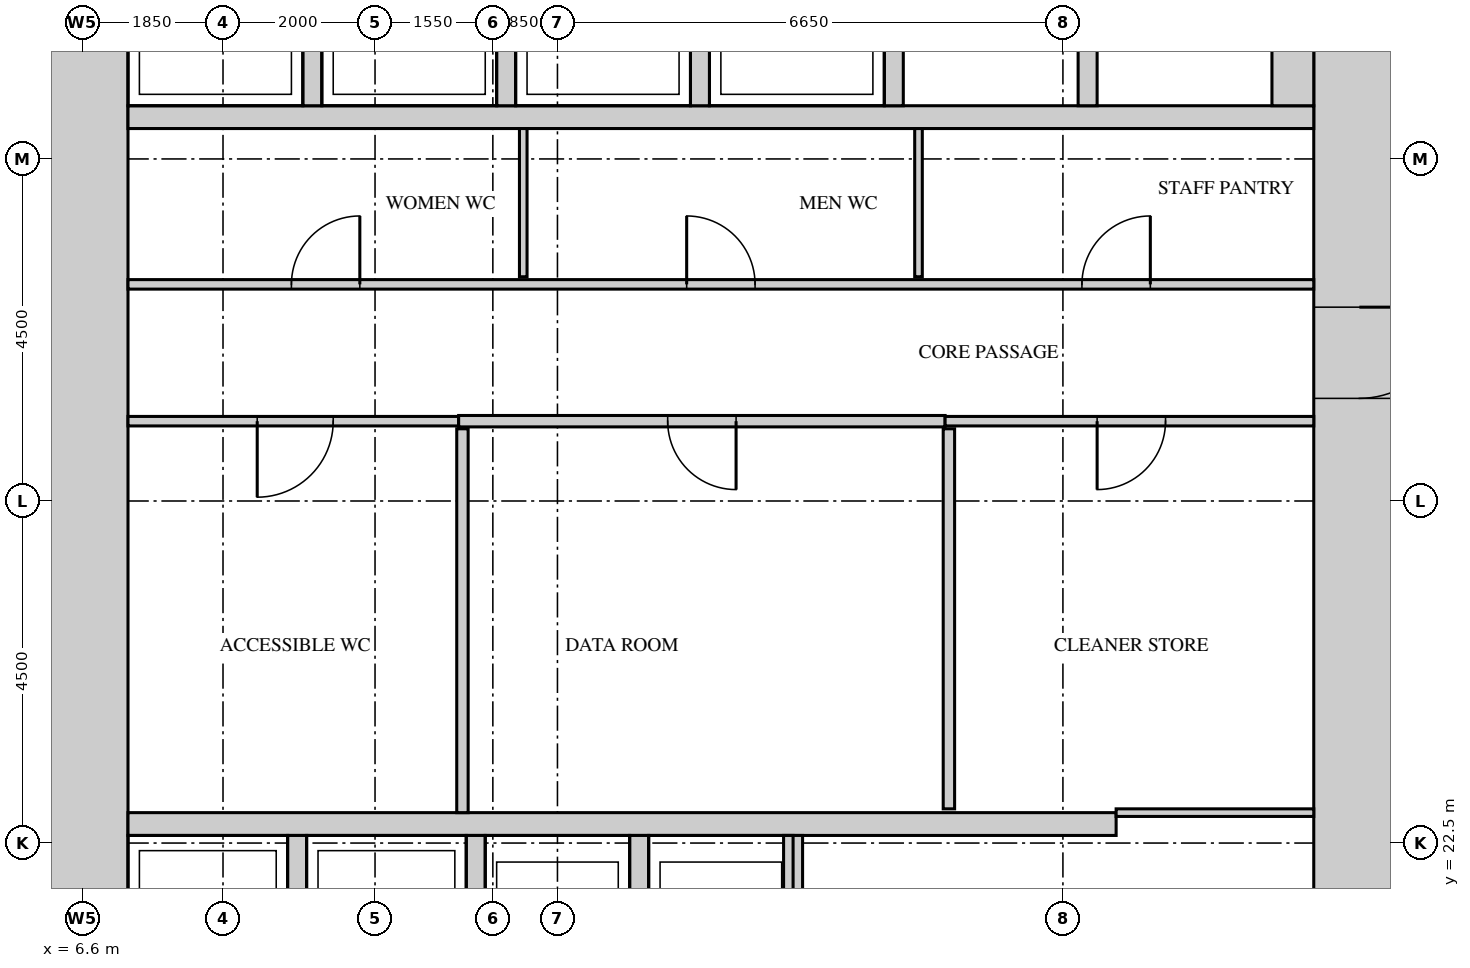
"""IFC4 building model, lengths in metres.
Left out: names, types, materials, properties, quantities, classifications, styles, units other than length and angle.
Written with IfcOpenShell. Run it as: python <this file> out.ifc"""

import sys

from ifc_helpers import new_model, si_unit, direction, frame, frame_2d, origin, place, context, subcontext, project, spatial, rectangle, extrude, source, transform, mapped, element, fill, save


model = new_model("IFC4")
c1 = context("Model", 3, precision=1e-05, world=origin(), true_north=direction((0.0, 1.0)))
c2 = subcontext(c1, "Body", "Model", "MODEL_VIEW")
j1 = project(units=[si_unit("LENGTHUNIT", "METRE"), si_unit("PLANEANGLEUNIT", "RADIAN")], contexts=[c1])
p1 = place(None, origin())
s1 = spatial("IfcSite", under=j1, at=p1, CompositionType="ELEMENT")
p2 = place(p1, origin())
s2 = spatial("IfcBuilding", under=s1, at=p2, CompositionType="ELEMENT")
p3 = place(p2, frame((0.0, 0.0, 46.5)))
s3 = spatial("IfcBuildingStorey", under=s2, at=p3, CompositionType="ELEMENT", Elevation=46.5)
m1 = source(origin(), c2, "Body", "SweptSolid", [
    extrude(rectangle(XDim=27.6, YDim=1.2, at=frame_2d((13.8, 0.0))), origin(), (0.0, 0.0, 1.0), 4.2),
])
p4 = place(p3, frame((23.4, 13.2, 0.0), z_axis=(0.0, 0.0, 1.0), x_axis=(0.0, 1.0, 0.0)))
e1 = element("IfcWall", 1, at=p4, inside=s3, PredefinedType="SHEAR", context=c2, shape_type="MappedRepresentation", body=[
    mapped(m1, transform((0.0, 0.0, 0.0))),
])
m2 = source(origin(), c2, "Body", "SweptSolid", [
    extrude(rectangle(XDim=1.8, YDim=2.1, at=frame_2d((0.9, 1.05))), frame((0.0, 0.61, 0.0), z_axis=(0.0, -1.0, 0.0), x_axis=(1.0, 0.0, 0.0)), (0.0, 0.0, 1.0), 1.22),
])
p5 = place(p4, frame((22.4, 0.0, 0.0)))
e2 = element("IfcOpeningElement", 2, at=p5, cuts=e1, PredefinedType="OPENING", context=c2, shape_type="MappedRepresentation", body=[
    mapped(m2, transform((0.0, 0.0, 0.0))),
])
m3 = source(origin(), c2, "Body", "SweptSolid", [
    extrude(rectangle(XDim=1.2, YDim=2.1, at=frame_2d((0.6, 1.05))), frame((0.0, 0.61, 0.0), z_axis=(0.0, -1.0, 0.0), x_axis=(1.0, 0.0, 0.0)), (0.0, 0.0, 1.0), 1.22),
])
p6 = place(p4, frame((15.15, 0.0, 0.0)))
e3 = element("IfcOpeningElement", 3, at=p6, cuts=e1, PredefinedType="OPENING", context=c2, shape_type="MappedRepresentation", body=[
    mapped(m3, transform((0.0, 0.0, 0.0))),
])
m4 = source(origin(), c2, "Body", "SweptSolid", [
    extrude(rectangle(XDim=0.9, YDim=2.1, at=frame_2d((0.45, 1.05))), frame((0.0, 0.61, 0.0), z_axis=(0.0, -1.0, 0.0), x_axis=(1.0, 0.0, 0.0)), (0.0, 0.0, 1.0), 1.22),
])
p7 = place(p4, frame((1.15, 0.0, 0.0)))
e4 = element("IfcOpeningElement", 4, at=p7, cuts=e1, PredefinedType="OPENING", context=c2, shape_type="MappedRepresentation", body=[
    mapped(m4, transform((0.0, 0.0, 0.0))),
])
p8 = place(p4, frame((4.35, 0.0, 0.0)))
e5 = element("IfcOpeningElement", 5, at=p8, cuts=e1, PredefinedType="OPENING", context=c2, shape_type="MappedRepresentation", body=[
    mapped(m4, transform((0.0, 0.0, 0.0))),
])
p9 = place(p4, frame((7.6, 0.0, 0.0)))
e6 = element("IfcOpeningElement", 6, at=p9, cuts=e1, PredefinedType="OPENING", context=c2, shape_type="MappedRepresentation", body=[
    mapped(m4, transform((0.0, 0.0, 0.0))),
])
p10 = place(p3, frame((6.6, 13.2, 0.0), z_axis=(0.0, 0.0, 1.0), x_axis=(0.0, 1.0, 0.0)))
e7 = element("IfcWall", 7, at=p10, inside=s3, PredefinedType="SHEAR", context=c2, shape_type="MappedRepresentation", body=[
    mapped(m1, transform((0.0, 0.0, 0.0))),
])
m5 = source(origin(), c2, "Body", "SweptSolid", [
    extrude(rectangle(XDim=13.0, YDim=0.3, at=frame_2d((6.5, 0.0))), origin(), (0.0, 0.0, 1.0), 4.2),
])
p11 = place(p3, frame((7.2, 22.75, 0.0), z_axis=(0.0, 0.0, 1.0), x_axis=(1.0, 0.0, 0.0)))
e8 = element("IfcWall", 8, at=p11, inside=s3, PredefinedType="STANDARD", context=c2, shape_type="MappedRepresentation", body=[
    mapped(m5, transform((0.0, 0.0, 0.0))),
])
m6 = source(origin(), c2, "Body", "SweptSolid", [
    extrude(rectangle(XDim=15.6, YDim=0.3, at=frame_2d((7.8, 0.0))), origin(), (0.0, 0.0, 1.0), 4.2),
])
p12 = place(p3, frame((7.2, 32.05, 0.0), z_axis=(0.0, 0.0, 1.0), x_axis=(1.0, 0.0, 0.0)))
e9 = element("IfcWall", 9, at=p12, inside=s3, PredefinedType="STANDARD", context=c2, shape_type="MappedRepresentation", body=[
    mapped(m6, transform((0.0, 0.0, 0.0))),
])
m7 = source(origin(), c2, "Body", "SweptSolid", [
    extrude(rectangle(XDim=3.1, YDim=0.25, at=frame_2d((1.55, 0.0))), origin(), (0.0, 0.0, 1.0), 4.2),
])
for number, where, z_axis, x_axis in (
    (10, (9.425, 19.5, 0.0), (0.0, 0.0, 1.0), (0.0, 1.0, 0.0)),
    (11, (11.775, 19.5, 0.0), (0.0, 0.0, 1.0), (0.0, 1.0, 0.0)),
    (12, (13.925, 19.5, 0.0), (0.0, 0.0, 1.0), (0.0, 1.0, 0.0)),
    (13, (15.95, 19.5, 0.0), (0.0, 0.0, 1.0), (0.0, 1.0, 0.0)),
):
    element("IfcWall", number, at=place(p3, frame(where, z_axis=z_axis, x_axis=x_axis)), inside=s3, PredefinedType="STANDARD", context=c2, shape_type="MappedRepresentation", body=[
        mapped(m7, transform((0.0, 0.0, 0.0))),
    ])
m8 = source(origin(), c2, "Body", "SweptSolid", [
    extrude(rectangle(XDim=2.4, YDim=0.25, at=frame_2d((1.2, 0.0))), origin(), (0.0, 0.0, 1.0), 4.2),
])
for number, where, z_axis, x_axis in (
    (14, (9.625, 32.2, 0.0), (0.0, 0.0, 1.0), (0.0, 1.0, 0.0)),
    (15, (12.175, 32.2, 0.0), (0.0, 0.0, 1.0), (0.0, 1.0, 0.0)),
    (16, (14.725, 32.2, 0.0), (0.0, 0.0, 1.0), (0.0, 1.0, 0.0)),
    (17, (17.275, 32.2, 0.0), (0.0, 0.0, 1.0), (0.0, 1.0, 0.0)),
    (18, (19.825, 32.2, 0.0), (0.0, 0.0, 1.0), (0.0, 1.0, 0.0)),
):
    element("IfcWall", number, at=place(p3, frame(where, z_axis=z_axis, x_axis=x_axis)), inside=s3, PredefinedType="STANDARD", context=c2, shape_type="MappedRepresentation", body=[
        mapped(m8, transform((0.0, 0.0, 0.0))),
    ])
m9 = source(origin(), c2, "Body", "SweptSolid", [
    extrude(rectangle(XDim=2.4, YDim=0.55, at=frame_2d((1.2, 0.0))), origin(), (0.0, 0.0, 1.0), 4.2),
])
p13 = place(p3, frame((22.525, 32.2, 0.0), z_axis=(0.0, 0.0, 1.0), x_axis=(0.0, 1.0, 0.0)))
e19 = element("IfcWall", 19, at=p13, inside=s3, PredefinedType="STANDARD", context=c2, shape_type="MappedRepresentation", body=[
    mapped(m9, transform((0.0, 0.0, 0.0))),
])
m10 = source(origin(), c2, "Body", "SweptSolid", [
    extrude(rectangle(XDim=5.05, YDim=0.15, at=frame_2d((2.525, 0.0))), origin(), (0.0, 0.0, 1.0), 4.3),
])
p14 = place(p3, frame((11.6, 22.9, 0.0), z_axis=(0.0, 0.0, 1.0), x_axis=(0.0, 1.0, 0.0)))
e20 = element("IfcWall", 20, at=p14, inside=s3, PredefinedType="PARTITIONING", context=c2, shape_type="MappedRepresentation", body=[
    mapped(m10, transform((0.0, 0.0, 0.0))),
])
m11 = source(origin(), c2, "Body", "SweptSolid", [
    extrude(rectangle(XDim=2.6, YDim=0.1, at=frame_2d((1.3, 0.0))), origin(), (0.0, 0.0, 1.0), 4.3),
])
p15 = place(p3, frame((20.2, 22.9, 0.0), z_axis=(0.0, 0.0, 1.0), x_axis=(1.0, 0.0, 0.0)))
e21 = element("IfcWall", 21, at=p15, inside=s3, PredefinedType="PARTITIONING", context=c2, shape_type="MappedRepresentation", body=[
    mapped(m11, transform((0.0, 0.0, 0.0))),
])
m12 = source(origin(), c2, "Body", "SweptSolid", [
    extrude(rectangle(XDim=5.0, YDim=0.15, at=frame_2d((2.5, 0.0))), origin(), (0.0, 0.0, 1.0), 4.3),
])
p16 = place(p3, frame((18.0, 22.95, 0.0), z_axis=(0.0, 0.0, 1.0), x_axis=(0.0, 1.0, 0.0)))
e22 = element("IfcWall", 22, at=p16, inside=s3, PredefinedType="PARTITIONING", context=c2, shape_type="MappedRepresentation", body=[
    mapped(m12, transform((0.0, 0.0, 0.0))),
])
m13 = source(origin(), c2, "Body", "SweptSolid", [
    extrude(rectangle(XDim=4.35, YDim=0.125, at=frame_2d((2.175, 0.0))), origin(), (0.0, 0.0, 1.0), 4.3),
])
p17 = place(p3, frame((7.2, 28.05, 0.0), z_axis=(0.0, 0.0, 1.0), x_axis=(1.0, 0.0, 0.0)))
e23 = element("IfcWall", 23, at=p17, inside=s3, PredefinedType="PARTITIONING", context=c2, shape_type="MappedRepresentation", body=[
    mapped(m13, transform((0.0, 0.0, 0.0))),
])
m14 = source(origin(), c2, "Body", "SweptSolid", [
    extrude(rectangle(XDim=1.0, YDim=2.1, at=frame_2d((0.5, 1.05))), frame((0.0, 0.073, 0.0), z_axis=(0.0, -1.0, 0.0), x_axis=(1.0, 0.0, 0.0)), (0.0, 0.0, 1.0), 0.145),
])
p18 = place(p17, frame((1.7, 0.0, 0.0)))
e24 = element("IfcOpeningElement", 24, at=p18, cuts=e23, PredefinedType="OPENING", context=c2, shape_type="MappedRepresentation", body=[
    mapped(m14, transform((0.0, 0.0, 0.0))),
])
m15 = source(origin(), c2, "Body", "SweptSolid", [
    extrude(rectangle(XDim=6.4, YDim=0.15, at=frame_2d((3.2, 0.0))), origin(), (0.0, 0.0, 1.0), 4.3),
])
p19 = place(p3, frame((11.55, 28.05, 0.0), z_axis=(0.0, 0.0, 1.0), x_axis=(1.0, 0.0, 0.0)))
e25 = element("IfcWall", 25, at=p19, inside=s3, PredefinedType="PARTITIONING", context=c2, shape_type="MappedRepresentation", body=[
    mapped(m15, transform((0.0, 0.0, 0.0))),
])
m16 = source(origin(), c2, "Body", "SweptSolid", [
    extrude(rectangle(XDim=0.9, YDim=2.1, at=frame_2d((0.45, 1.05))), frame((0.0, 0.085, 0.0), z_axis=(0.0, -1.0, 0.0), x_axis=(1.0, 0.0, 0.0)), (0.0, 0.0, 1.0), 0.17),
])
p20 = place(p19, frame((2.75, 0.0, 0.0)))
e26 = element("IfcOpeningElement", 26, at=p20, cuts=e25, PredefinedType="OPENING", context=c2, shape_type="MappedRepresentation", body=[
    mapped(m16, transform((0.0, 0.0, 0.0))),
])
m17 = source(origin(), c2, "Body", "SweptSolid", [
    extrude(rectangle(XDim=4.85, YDim=0.125, at=frame_2d((2.425, 0.0))), origin(), (0.0, 0.0, 1.0), 4.3),
])
p21 = place(p3, frame((17.95, 28.05, 0.0), z_axis=(0.0, 0.0, 1.0), x_axis=(1.0, 0.0, 0.0)))
e27 = element("IfcWall", 27, at=p21, inside=s3, PredefinedType="PARTITIONING", context=c2, shape_type="MappedRepresentation", body=[
    mapped(m17, transform((0.0, 0.0, 0.0))),
])
m18 = source(origin(), c2, "Body", "SweptSolid", [
    extrude(rectangle(XDim=0.9, YDim=2.1, at=frame_2d((0.45, 1.05))), frame((0.0, 0.073, 0.0), z_axis=(0.0, -1.0, 0.0), x_axis=(1.0, 0.0, 0.0)), (0.0, 0.0, 1.0), 0.145),
])
p22 = place(p21, frame((2.0, 0.0, 0.0)))
e28 = element("IfcOpeningElement", 28, at=p22, cuts=e27, PredefinedType="OPENING", context=c2, shape_type="MappedRepresentation", body=[
    mapped(m18, transform((0.0, 0.0, 0.0))),
])
m19 = source(origin(), c2, "Body", "SweptSolid", [
    extrude(rectangle(XDim=15.6, YDim=0.125, at=frame_2d((7.8, 0.0))), origin(), (0.0, 0.0, 1.0), 4.3),
])
p23 = place(p3, frame((7.2, 29.85, 0.0), z_axis=(0.0, 0.0, 1.0), x_axis=(1.0, 0.0, 0.0)))
e29 = element("IfcWall", 29, at=p23, inside=s3, PredefinedType="PARTITIONING", context=c2, shape_type="MappedRepresentation", body=[
    mapped(m19, transform((0.0, 0.0, 0.0))),
])
p24 = place(p23, frame((2.15, 0.0, 0.0)))
e30 = element("IfcOpeningElement", 30, at=p24, cuts=e29, PredefinedType="OPENING", context=c2, shape_type="MappedRepresentation", body=[
    mapped(m18, transform((0.0, 0.0, 0.0))),
])
p25 = place(p23, frame((7.35, 0.0, 0.0)))
e31 = element("IfcOpeningElement", 31, at=p25, cuts=e29, PredefinedType="OPENING", context=c2, shape_type="MappedRepresentation", body=[
    mapped(m18, transform((0.0, 0.0, 0.0))),
])
p26 = place(p23, frame((12.55, 0.0, 0.0)))
e32 = element("IfcOpeningElement", 32, at=p26, cuts=e29, PredefinedType="OPENING", context=c2, shape_type="MappedRepresentation", body=[
    mapped(m18, transform((0.0, 0.0, 0.0))),
])
m20 = source(origin(), c2, "Body", "SweptSolid", [
    extrude(rectangle(XDim=1.95, YDim=0.1, at=frame_2d((0.975, 0.0))), origin(), (0.0, 0.0, 1.0), 4.3),
])
for number, where, z_axis, x_axis in (
    (33, (12.4, 29.95, 0.0), (0.0, 0.0, 1.0), (0.0, 1.0, 0.0)),
    (34, (17.6, 29.95, 0.0), (0.0, 0.0, 1.0), (0.0, 1.0, 0.0)),
):
    element("IfcWall", number, at=place(p3, frame(where, z_axis=z_axis, x_axis=x_axis)), inside=s3, PredefinedType="PARTITIONING", context=c2, shape_type="MappedRepresentation", body=[
        mapped(m20, transform((0.0, 0.0, 0.0))),
    ])
m21 = source(origin(), c2, "Body", "SweptSolid", [
    extrude(rectangle(XDim=1.2, YDim=2.1, at=frame_2d((0.6, 1.05))), frame((0.0, 0.55, 0.0), z_axis=(0.0, -1.0, 0.0), x_axis=(1.0, 0.0, 0.0)), (0.0, 0.0, 1.0), 1.1),
])
p27 = place(p6, origin())
e35 = element("IfcDoor", 35, at=p27, inside=s3, OperationType="SINGLE_SWING_RIGHT", PredefinedType="DOOR", context=c2, shape_type="MappedRepresentation", body=[
    mapped(m21, transform((0.0, 0.0, 0.0))),
])
fill(e3, e35)
m22 = source(origin(), c2, "Body", "SweptSolid", [
    extrude(rectangle(XDim=0.9, YDim=2.1, at=frame_2d((0.45, 1.05))), frame((0.0, 0.025, 0.0), z_axis=(0.0, -1.0, 0.0), x_axis=(1.0, 0.0, 0.0)), (0.0, 0.0, 1.0), 0.05),
])
p28 = place(p24, origin())
e36 = element("IfcDoor", 36, at=p28, inside=s3, OperationType="SINGLE_SWING_LEFT", PredefinedType="DOOR", context=c2, shape_type="MappedRepresentation", body=[
    mapped(m22, transform((0.0, 0.0, 0.0))),
])
fill(e30, e36)
p29 = place(p25, origin())
e37 = element("IfcDoor", 37, at=p29, inside=s3, OperationType="SINGLE_SWING_RIGHT", PredefinedType="DOOR", context=c2, shape_type="MappedRepresentation", body=[
    mapped(m22, transform((0.0, 0.0, 0.0))),
])
fill(e31, e37)
p30 = place(p26, origin())
e38 = element("IfcDoor", 38, at=p30, inside=s3, OperationType="SINGLE_SWING_LEFT", PredefinedType="DOOR", context=c2, shape_type="MappedRepresentation", body=[
    mapped(m22, transform((0.0, 0.0, 0.0))),
])
fill(e32, e38)
m23 = source(origin(), c2, "Body", "SweptSolid", [
    extrude(rectangle(XDim=1.0, YDim=2.1, at=frame_2d((0.5, 1.05))), frame((0.0, 0.025, 0.0), z_axis=(0.0, -1.0, 0.0), x_axis=(1.0, 0.0, 0.0)), (0.0, 0.0, 1.0), 0.05),
])
p31 = place(p18, origin())
e39 = element("IfcDoor", 39, at=p31, inside=s3, OperationType="SINGLE_SWING_LEFT", PredefinedType="DOOR", context=c2, shape_type="MappedRepresentation", body=[
    mapped(m23, transform((0.0, 0.0, 0.0))),
])
fill(e24, e39)
p32 = place(p20, origin())
e40 = element("IfcDoor", 40, at=p32, inside=s3, OperationType="SINGLE_SWING_RIGHT", PredefinedType="DOOR", context=c2, shape_type="MappedRepresentation", body=[
    mapped(m22, transform((0.0, 0.0, 0.0))),
])
fill(e26, e40)
p33 = place(p22, origin())
e41 = element("IfcDoor", 41, at=p33, inside=s3, OperationType="SINGLE_SWING_LEFT", PredefinedType="DOOR", context=c2, shape_type="MappedRepresentation", body=[
    mapped(m22, transform((0.0, 0.0, 0.0))),
])
fill(e28, e41)
save(model, sys.argv[1])
